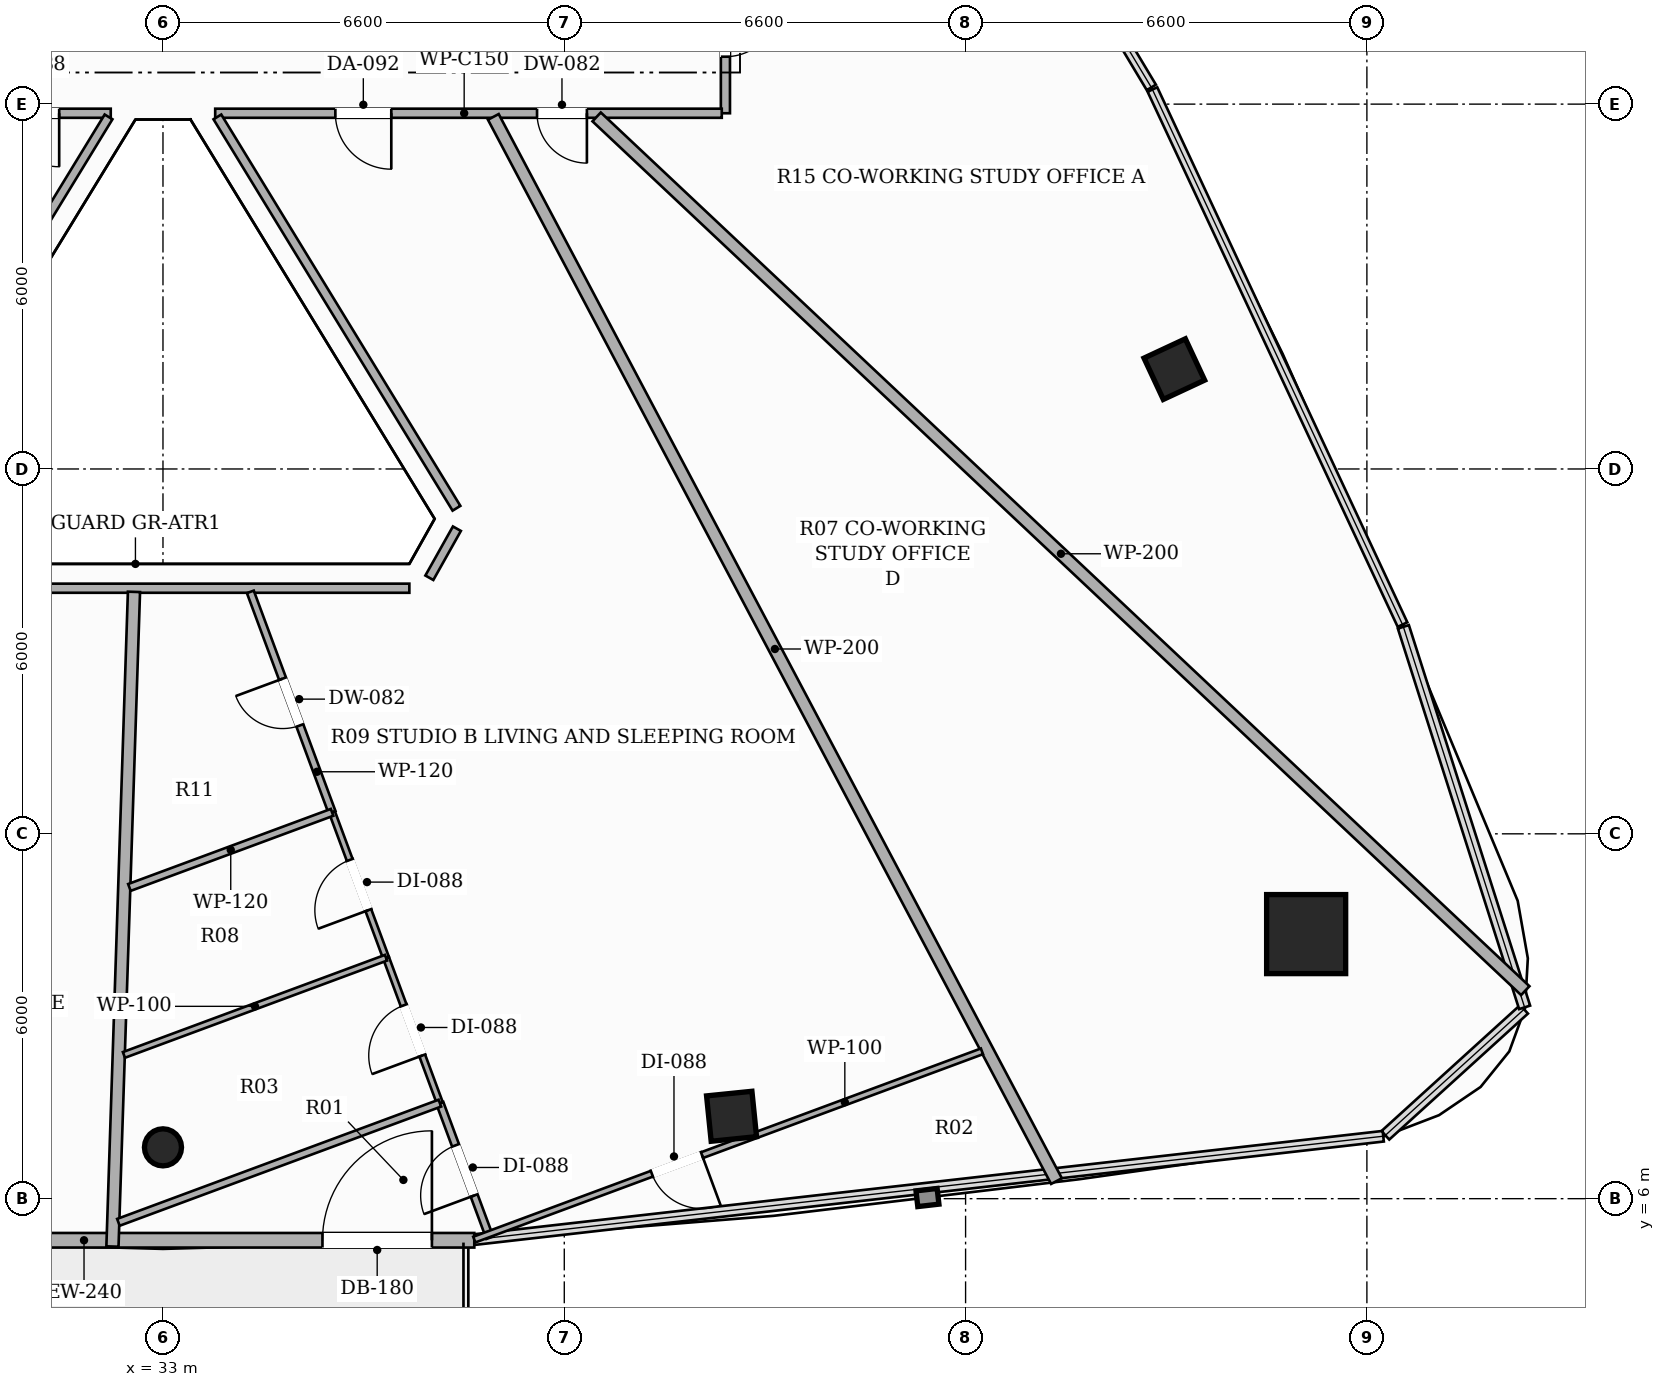
"""IFC4 building model, lengths in metres.
Left out: names, types, materials, properties, quantities, classifications, styles, units other than length and angle.
Written with IfcOpenShell. Run it as: python <this file> out.ifc"""

import sys

from ifc_helpers import new_model, si_unit, direction, frame, frame_2d, origin, origin_2d, place, context, subcontext, project, spatial, rectangle, hollow_rectangle, hollow_circle, extrude, element, fill, save


model = new_model("IFC4")
c1 = context("Model", 3, precision=1e-05, world=origin(), true_north=direction((0.0, 1.0)))
c2 = subcontext(c1, "Body", "Model", "MODEL_VIEW")
j1 = project(units=[si_unit("LENGTHUNIT", "METRE"), si_unit("PLANEANGLEUNIT", "RADIAN")], contexts=[c1])
p1 = place(None, origin())
s1 = spatial("IfcSite", under=j1, at=p1, CompositionType="ELEMENT")
p2 = place(p1, origin())
s2 = spatial("IfcBuilding", under=s1, at=p2, CompositionType="ELEMENT")
p3 = place(p2, frame((0.0, 0.0, 243.65)))
s3 = spatial("IfcBuildingStorey", under=s2, at=p3, CompositionType="ELEMENT", Elevation=243.65)
p4 = place(p3, frame((51.801, 10.351, 0.0), z_axis=(0.0, 0.0, 1.0), x_axis=(1.0, 0.0, 0.0)))
e1 = element("IfcColumn", 1, at=p4, inside=s3, PredefinedType="COLUMN", context=c2, shape_type="SweptSolid", body=[
    extrude(hollow_rectangle(XDim=1.3, YDim=1.3, WallThickness=0.04, at=origin_2d()), origin(), (0.0, 0.0, 1.0), 3.3),
])
p5 = place(p3, frame((33.0, 6.844, 0.0), z_axis=(0.0, 0.0, 1.0), x_axis=(1.0, 0.0, 0.0)))
e2 = element("IfcColumn", 2, at=p5, inside=s3, PredefinedType="COLUMN", context=c2, shape_type="SweptSolid", body=[
    extrude(hollow_circle(Radius=0.305, WallThickness=0.016, at=origin_2d()), origin(), (0.0, 0.0, 1.0), 3.3),
])
for number, where, z_axis, x_axis in (
    (3, (42.351, 7.355, 0.0), (0.0, 0.0, 1.0), (0.995, 0.101, 0.0)),
    (4, (49.633, 19.642, 0.0), (0.0, 0.0, 1.0), (-0.423, 0.906, 0.0)),
):
    element("IfcColumn", number, at=place(p3, frame(where, z_axis=z_axis, x_axis=x_axis)), inside=s3, PredefinedType="COLUMN", context=c2, shape_type="SweptSolid", body=[
        extrude(hollow_rectangle(XDim=0.75, YDim=0.75, WallThickness=0.025, at=origin_2d()), origin(), (0.0, 0.0, 1.0), 3.3),
    ])
p6 = place(p3, frame((27.88, 5.316, 0.0), z_axis=(0.0, 0.0, 1.0), x_axis=(1.0, 0.0, 0.0)))
e5 = element("IfcWall", 5, at=p6, inside=s3, PredefinedType="SOLIDWALL", context=c2, shape_type="SweptSolid", body=[
    extrude(rectangle(XDim=10.24, YDim=0.24, at=frame_2d((5.12, 0.0))), origin(), (0.0, 0.0, 1.0), 2.624),
])
p7 = place(p6, frame((7.743, 0.0, 0.0)))
e6 = element("IfcOpeningElement", 6, at=p7, cuts=e5, PredefinedType="OPENING", context=c2, shape_type="SweptSolid", body=[
    extrude(rectangle(XDim=1.8, YDim=2.2, at=frame_2d((0.9, 1.1))), frame((0.0, 0.13, 0.0), z_axis=(0.0, -1.0, 0.0), x_axis=(1.0, 0.0, 0.0)), (0.0, 0.0, 1.0), 0.26),
])
p8 = place(p3, frame((32.141, 23.85, 0.0), z_axis=(0.0, 0.0, 1.0), x_axis=(-1.0, 0.0, 0.0)))
e7 = element("IfcWall", 7, at=p8, inside=s3, PredefinedType="PARTITIONING", context=c2, shape_type="SweptSolid", body=[
    extrude(rectangle(XDim=8.491, YDim=0.15, at=frame_2d((4.246, 0.0))), origin(), (0.0, 0.0, 1.0), 2.565),
])
p9 = place(p8, frame((0.848, 0.0, 0.0)))
e8 = element("IfcOpeningElement", 8, at=p9, cuts=e7, PredefinedType="OPENING", context=c2, shape_type="SweptSolid", body=[
    extrude(rectangle(XDim=0.88, YDim=2.1, at=frame_2d((0.44, 1.05))), frame((0.0, 0.085, 0.0), z_axis=(0.0, -1.0, 0.0), x_axis=(1.0, 0.0, 0.0)), (0.0, 0.0, 1.0), 0.17),
])
p10 = place(p8, frame((2.616, 0.0, 0.0)))
e9 = element("IfcOpeningElement", 9, at=p10, cuts=e7, PredefinedType="OPENING", context=c2, shape_type="SweptSolid", body=[
    extrude(rectangle(XDim=0.88, YDim=2.1, at=frame_2d((0.44, 1.05))), frame((0.0, 0.085, 0.0), z_axis=(0.0, -1.0, 0.0), x_axis=(1.0, 0.0, 0.0)), (0.0, 0.0, 1.0), 0.17),
])
p11 = place(p8, frame((4.567, 0.0, 0.0)))
e10 = element("IfcOpeningElement", 10, at=p11, cuts=e7, PredefinedType="OPENING", context=c2, shape_type="SweptSolid", body=[
    extrude(rectangle(XDim=0.88, YDim=2.1, at=frame_2d((0.44, 1.05))), frame((0.0, 0.085, 0.0), z_axis=(0.0, -1.0, 0.0), x_axis=(1.0, 0.0, 0.0)), (0.0, 0.0, 1.0), 0.17),
])
p12 = place(p3, frame((42.25, 26.59, 0.0), z_axis=(0.0, 0.0, 1.0), x_axis=(0.0, -1.0, 0.0)))
e11 = element("IfcWall", 11, at=p12, inside=s3, PredefinedType="PARTITIONING", context=c2, shape_type="SweptSolid", body=[
    extrude(rectangle(XDim=2.74, YDim=0.15, at=frame_2d((1.37, 0.0))), origin(), (0.0, 0.0, 1.0), 2.773),
])
p13 = place(p12, frame((0.93, 0.0, 0.0)))
e12 = element("IfcOpeningElement", 12, at=p13, cuts=e11, PredefinedType="OPENING", context=c2, shape_type="SweptSolid", body=[
    extrude(rectangle(XDim=0.88, YDim=2.1, at=frame_2d((0.44, 1.05))), frame((0.0, 0.085, 0.0), z_axis=(0.0, -1.0, 0.0), x_axis=(1.0, 0.0, 0.0)), (0.0, 0.0, 1.0), 0.17),
])
p14 = place(p3, frame((42.19, 23.85, 0.0), z_axis=(0.0, 0.0, 1.0), x_axis=(-1.0, 0.0, 0.0)))
e13 = element("IfcWall", 13, at=p14, inside=s3, PredefinedType="PARTITIONING", context=c2, shape_type="SweptSolid", body=[
    extrude(rectangle(XDim=8.331, YDim=0.15, at=frame_2d((4.166, 0.0))), origin(), (0.0, 0.0, 1.0), 2.565),
])
p15 = place(p14, frame((5.435, 0.0, 0.0)))
e14 = element("IfcOpeningElement", 14, at=p15, cuts=e13, PredefinedType="OPENING", context=c2, shape_type="SweptSolid", body=[
    extrude(rectangle(XDim=0.92, YDim=2.15, at=frame_2d((0.46, 1.075))), frame((0.0, 0.085, 0.0), z_axis=(0.0, -1.0, 0.0), x_axis=(1.0, 0.0, 0.0)), (0.0, 0.0, 1.0), 0.17),
])
p16 = place(p14, frame((2.218, 0.0, 0.0)))
e15 = element("IfcOpeningElement", 15, at=p16, cuts=e13, PredefinedType="OPENING", context=c2, shape_type="SweptSolid", body=[
    extrude(rectangle(XDim=0.82, YDim=2.1, at=frame_2d((0.41, 1.05))), frame((0.0, 0.085, 0.0), z_axis=(0.0, -1.0, 0.0), x_axis=(1.0, 0.0, 0.0)), (0.0, 0.0, 1.0), 0.17),
])
p17 = place(p3, frame((33.895, 23.79, 0.0), z_axis=(0.0, 0.0, 1.0), x_axis=(0.521329541742, -0.85335544113, 0.0)))
e16 = element("IfcWall", 16, at=p17, inside=s3, PredefinedType="PARTITIONING", context=c2, shape_type="SweptSolid", body=[
    extrude(rectangle(XDim=7.542, YDim=0.15, at=frame_2d((3.771, 0.0))), origin(), (0.0, 0.0, 1.0), 2.773),
])
p18 = place(p3, frame((37.834, 17.018, 0.0), z_axis=(0.0, 0.0, 1.0), x_axis=(-0.489334167997, -0.872096366252, 0.0)))
e17 = element("IfcWall", 17, at=p18, inside=s3, PredefinedType="PARTITIONING", context=c2, shape_type="SweptSolid", body=[
    extrude(rectangle(XDim=0.926, YDim=0.15, at=frame_2d((0.463, 0.0))), origin(), (0.0, 0.0, 1.0), 3.06),
])
p19 = place(p3, frame((37.052, 16.039, 0.0), z_axis=(0.0, 0.0, 1.0), x_axis=(-1.0, 0.0, 0.0)))
e18 = element("IfcWall", 18, at=p19, inside=s3, PredefinedType="PARTITIONING", context=c2, shape_type="SweptSolid", body=[
    extrude(rectangle(XDim=8.104, YDim=0.15, at=frame_2d((4.052, 0.0))), origin(), (0.0, 0.0, 1.0), 2.773),
])
p20 = place(p3, frame((28.173, 17.354, 0.0), z_axis=(0.0, 0.0, 1.0), x_axis=(0.521329541742, 0.85335544113, 0.0)))
e19 = element("IfcWall", 19, at=p20, inside=s3, PredefinedType="PARTITIONING", context=c2, shape_type="SweptSolid", body=[
    extrude(rectangle(XDim=7.542, YDim=0.15, at=frame_2d((3.771, 0.0))), origin(), (0.0, 0.0, 1.0), 2.773),
])
p21 = place(p3, frame((55.405, 9.421, 0.0), z_axis=(0.0, 0.0, 1.0), x_axis=(-0.728328495468, 0.685228139155, 0.0)))
e20 = element("IfcWall", 20, at=p21, inside=s3, PredefinedType="PARTITIONING", context=c2, shape_type="SweptSolid", body=[
    extrude(rectangle(XDim=20.97, YDim=0.2, at=frame_2d((10.485, 0.0))), origin(), (0.0, 0.0, 1.0), 2.492),
])
p22 = place(p3, frame((38.433, 23.79, 0.0), z_axis=(0.0, 0.0, 1.0), x_axis=(0.467759118023, -0.88385598799, 0.0)))
e21 = element("IfcWall", 21, at=p22, inside=s3, PredefinedType="PARTITIONING", context=c2, shape_type="SweptSolid", body=[
    extrude(rectangle(XDim=19.801, YDim=0.2, at=frame_2d((9.9, 0.0))), origin(), (0.0, 0.0, 1.0), 2.492),
])
p23 = place(p3, frame((32.169, 5.213, 0.0), z_axis=(0.0, 0.0, 1.0), x_axis=(0.032863548895, 0.999459847695, 0.0)))
e22 = element("IfcWall", 22, at=p23, inside=s3, PredefinedType="PARTITIONING", context=c2, shape_type="SweptSolid", body=[
    extrude(rectangle(XDim=10.772, YDim=0.2, at=frame_2d((5.386, 0.0))), origin(), (0.0, 0.0, 1.0), 2.492),
])
p24 = place(p3, frame((35.781, 12.353, 0.0), z_axis=(0.0, 0.0, 1.0), x_axis=(-0.347550810428, 0.937661151041, 0.0)))
e23 = element("IfcWall", 23, at=p24, inside=s3, PredefinedType="PARTITIONING", context=c2, shape_type="SweptSolid", body=[
    extrude(rectangle(XDim=3.867, YDim=0.12, at=frame_2d((1.934, 0.0))), origin(), (0.0, 0.0, 1.0), 3.06),
])
p25 = place(p24, frame((1.524, 0.0, 0.0)))
e24 = element("IfcOpeningElement", 24, at=p25, cuts=e23, PredefinedType="OPENING", context=c2, shape_type="SweptSolid", body=[
    extrude(rectangle(XDim=0.82, YDim=2.1, at=frame_2d((0.41, 1.05))), frame((0.0, 0.07, 0.0), z_axis=(0.0, -1.0, 0.0), x_axis=(1.0, 0.0, 0.0)), (0.0, 0.0, 1.0), 0.14),
])
p26 = place(p3, frame((38.375, 5.358, 0.0), z_axis=(0.0, 0.0, 1.0), x_axis=(-0.347822952978, 0.937560234535, 0.0)))
e25 = element("IfcWall", 25, at=p26, inside=s3, PredefinedType="PARTITIONING", context=c2, shape_type="SweptSolid", body=[
    extrude(rectangle(XDim=2.361, YDim=0.12, at=frame_2d((1.18, 0.0))), origin(), (0.0, 0.0, 1.0), 2.492),
])
p27 = place(p26, frame((0.74, 0.0, 0.0)))
e26 = element("IfcOpeningElement", 26, at=p27, cuts=e25, PredefinedType="OPENING", context=c2, shape_type="SweptSolid", body=[
    extrude(rectangle(XDim=0.88, YDim=2.1, at=frame_2d((0.44, 1.05))), frame((0.0, 0.07, 0.0), z_axis=(0.0, -1.0, 0.0), x_axis=(1.0, 0.0, 0.0)), (0.0, 0.0, 1.0), 0.14),
])
p28 = place(p3, frame((37.554, 7.571, 0.0), z_axis=(0.0, 0.0, 1.0), x_axis=(-0.347479633163, 0.93768753033, 0.0)))
e27 = element("IfcWall", 27, at=p28, inside=s3, PredefinedType="PARTITIONING", context=c2, shape_type="SweptSolid", body=[
    extrude(rectangle(XDim=2.55, YDim=0.1, at=frame_2d((1.275, 0.0))), origin(), (0.0, 0.0, 1.0), 2.773),
])
p29 = place(p28, frame((0.835, 0.0, 0.0)))
e28 = element("IfcOpeningElement", 28, at=p29, cuts=e27, PredefinedType="OPENING", context=c2, shape_type="SweptSolid", body=[
    extrude(rectangle(XDim=0.88, YDim=2.1, at=frame_2d((0.44, 1.05))), frame((0.0, 0.06, 0.0), z_axis=(0.0, -1.0, 0.0), x_axis=(1.0, 0.0, 0.0)), (0.0, 0.0, 1.0), 0.12),
])
p30 = place(p3, frame((46.469, 8.423, 0.0), z_axis=(0.0, 0.0, 1.0), x_axis=(-0.937601832004, -0.34771080602, 0.0)))
e29 = element("IfcWall", 29, at=p30, inside=s3, PredefinedType="PARTITIONING", context=c2, shape_type="SweptSolid", body=[
    extrude(rectangle(XDim=8.905, YDim=0.1, at=frame_2d((4.452, 0.0))), origin(), (0.0, 0.0, 1.0), 2.492),
])
p31 = place(p30, frame((4.91, 0.0, 0.0)))
e30 = element("IfcOpeningElement", 30, at=p31, cuts=e29, PredefinedType="OPENING", context=c2, shape_type="SweptSolid", body=[
    extrude(rectangle(XDim=0.88, YDim=2.1, at=frame_2d((0.44, 1.05))), frame((0.0, 0.06, 0.0), z_axis=(0.0, -1.0, 0.0), x_axis=(1.0, 0.0, 0.0)), (0.0, 0.0, 1.0), 0.12),
])
p32 = place(p3, frame((36.668, 9.962, 0.0), z_axis=(0.0, 0.0, 1.0), x_axis=(-0.347785106968, 0.937574274056, 0.0)))
e31 = element("IfcWall", 31, at=p32, inside=s3, PredefinedType="PARTITIONING", context=c2, shape_type="SweptSolid", body=[
    extrude(rectangle(XDim=2.55, YDim=0.1, at=frame_2d((1.275, 0.0))), origin(), (0.0, 0.0, 1.0), 3.06),
])
p33 = place(p32, frame((0.835, 0.0, 0.0)))
e32 = element("IfcOpeningElement", 32, at=p33, cuts=e31, PredefinedType="OPENING", context=c2, shape_type="SweptSolid", body=[
    extrude(rectangle(XDim=0.88, YDim=2.1, at=frame_2d((0.44, 1.05))), frame((0.0, 0.06, 0.0), z_axis=(0.0, -1.0, 0.0), x_axis=(1.0, 0.0, 0.0)), (0.0, 0.0, 1.0), 0.12),
])
p34 = place(p3, frame((35.781, 12.353, 0.0), z_axis=(0.0, 0.0, 1.0), x_axis=(-0.937688263894, -0.347477653607, 0.0)))
e33 = element("IfcWall", 33, at=p34, inside=s3, PredefinedType="PARTITIONING", context=c2, shape_type="SweptSolid", body=[
    extrude(rectangle(XDim=3.554, YDim=0.12, at=frame_2d((1.777, 0.0))), origin(), (0.0, 0.0, 1.0), 2.773),
])
p35 = place(p3, frame((32.267, 5.611, 0.0), z_axis=(0.0, 0.0, 1.0), x_axis=(0.937641120959, 0.347604845027, 0.0)))
e34 = element("IfcWall", 34, at=p35, inside=s3, PredefinedType="PARTITIONING", context=c2, shape_type="SweptSolid", body=[
    extrude(rectangle(XDim=5.638, YDim=0.12, at=frame_2d((2.819, 0.0))), origin(), (0.0, 0.0, 1.0), 2.492),
])
p36 = place(p3, frame((32.358, 8.364, 0.0), z_axis=(0.0, 0.0, 1.0), x_axis=(0.937636593966, 0.34761705605, 0.0)))
e35 = element("IfcWall", 35, at=p36, inside=s3, PredefinedType="PARTITIONING", context=c2, shape_type="SweptSolid", body=[
    extrude(rectangle(XDim=4.597, YDim=0.1, at=frame_2d((2.298, 0.0))), origin(), (0.0, 0.0, 1.0), 2.773),
])
p37 = place(p7, origin())
e36 = element("IfcDoor", 36, at=p37, inside=s3, OperationType="SINGLE_SWING_RIGHT", PredefinedType="DOOR", context=c2, shape_type="SweptSolid", body=[
    extrude(rectangle(XDim=1.8, YDim=2.2, at=frame_2d((0.9, 1.1))), frame((0.0, 0.025, 0.0), z_axis=(0.0, -1.0, 0.0), x_axis=(1.0, 0.0, 0.0)), (0.0, 0.0, 1.0), 0.05),
])
fill(e6, e36)
p38 = place(p13, origin())
e37 = element("IfcDoor", 37, at=p38, inside=s3, OperationType="SINGLE_SWING_LEFT", PredefinedType="DOOR", context=c2, shape_type="SweptSolid", body=[
    extrude(rectangle(XDim=0.88, YDim=2.1, at=frame_2d((0.44, 1.05))), frame((0.0, 0.025, 0.0), z_axis=(0.0, -1.0, 0.0), x_axis=(1.0, 0.0, 0.0)), (0.0, 0.0, 1.0), 0.05),
])
fill(e12, e37)
p39 = place(p15, origin())
e38 = element("IfcDoor", 38, at=p39, inside=s3, OperationType="SINGLE_SWING_LEFT", PredefinedType="DOOR", context=c2, shape_type="SweptSolid", body=[
    extrude(rectangle(XDim=0.92, YDim=2.15, at=frame_2d((0.46, 1.075))), frame((0.0, 0.025, 0.0), z_axis=(0.0, -1.0, 0.0), x_axis=(1.0, 0.0, 0.0)), (0.0, 0.0, 1.0), 0.05),
])
fill(e14, e38)
p40 = place(p25, origin())
e39 = element("IfcDoor", 39, at=p40, inside=s3, OperationType="SINGLE_SWING_RIGHT", PredefinedType="DOOR", context=c2, shape_type="SweptSolid", body=[
    extrude(rectangle(XDim=0.82, YDim=2.1, at=frame_2d((0.41, 1.05))), frame((0.0, 0.025, 0.0), z_axis=(0.0, -1.0, 0.0), x_axis=(1.0, 0.0, 0.0)), (0.0, 0.0, 1.0), 0.05),
])
fill(e24, e39)
p41 = place(p27, origin())
e40 = element("IfcDoor", 40, at=p41, inside=s3, OperationType="SINGLE_SWING_LEFT", PredefinedType="DOOR", context=c2, shape_type="SweptSolid", body=[
    extrude(rectangle(XDim=0.88, YDim=2.1, at=frame_2d((0.44, 1.05))), frame((0.0, 0.025, 0.0), z_axis=(0.0, -1.0, 0.0), x_axis=(1.0, 0.0, 0.0)), (0.0, 0.0, 1.0), 0.05),
])
fill(e26, e40)
p42 = place(p29, origin())
e41 = element("IfcDoor", 41, at=p42, inside=s3, OperationType="SINGLE_SWING_LEFT", PredefinedType="DOOR", context=c2, shape_type="SweptSolid", body=[
    extrude(rectangle(XDim=0.88, YDim=2.1, at=frame_2d((0.44, 1.05))), frame((0.0, 0.025, 0.0), z_axis=(0.0, -1.0, 0.0), x_axis=(1.0, 0.0, 0.0)), (0.0, 0.0, 1.0), 0.05),
])
fill(e28, e41)
p43 = place(p31, origin())
e42 = element("IfcDoor", 42, at=p43, inside=s3, OperationType="SINGLE_SWING_LEFT", PredefinedType="DOOR", context=c2, shape_type="SweptSolid", body=[
    extrude(rectangle(XDim=0.88, YDim=2.1, at=frame_2d((0.44, 1.05))), frame((0.0, 0.025, 0.0), z_axis=(0.0, -1.0, 0.0), x_axis=(1.0, 0.0, 0.0)), (0.0, 0.0, 1.0), 0.05),
])
fill(e30, e42)
p44 = place(p33, origin())
e43 = element("IfcDoor", 43, at=p44, inside=s3, OperationType="SINGLE_SWING_LEFT", PredefinedType="DOOR", context=c2, shape_type="SweptSolid", body=[
    extrude(rectangle(XDim=0.88, YDim=2.1, at=frame_2d((0.44, 1.05))), frame((0.0, 0.025, 0.0), z_axis=(0.0, -1.0, 0.0), x_axis=(1.0, 0.0, 0.0)), (0.0, 0.0, 1.0), 0.05),
])
fill(e32, e43)
p45 = place(p16, origin())
e44 = element("IfcDoor", 44, at=p45, inside=s3, OperationType="SINGLE_SWING_LEFT", PredefinedType="DOOR", context=c2, shape_type="SweptSolid", body=[
    extrude(rectangle(XDim=0.82, YDim=2.1, at=frame_2d((0.41, 1.05))), frame((0.0, 0.025, 0.0), z_axis=(0.0, -1.0, 0.0), x_axis=(1.0, 0.0, 0.0)), (0.0, 0.0, 1.0), 0.05),
])
fill(e15, e44)
p46 = place(p9, origin())
e45 = element("IfcDoor", 45, at=p46, inside=s3, OperationType="SINGLE_SWING_LEFT", PredefinedType="DOOR", context=c2, shape_type="SweptSolid", body=[
    extrude(rectangle(XDim=0.88, YDim=2.1, at=frame_2d((0.44, 1.05))), frame((0.0, 0.025, 0.0), z_axis=(0.0, -1.0, 0.0), x_axis=(1.0, 0.0, 0.0)), (0.0, 0.0, 1.0), 0.05),
])
fill(e8, e45)
save(model, sys.argv[1])
